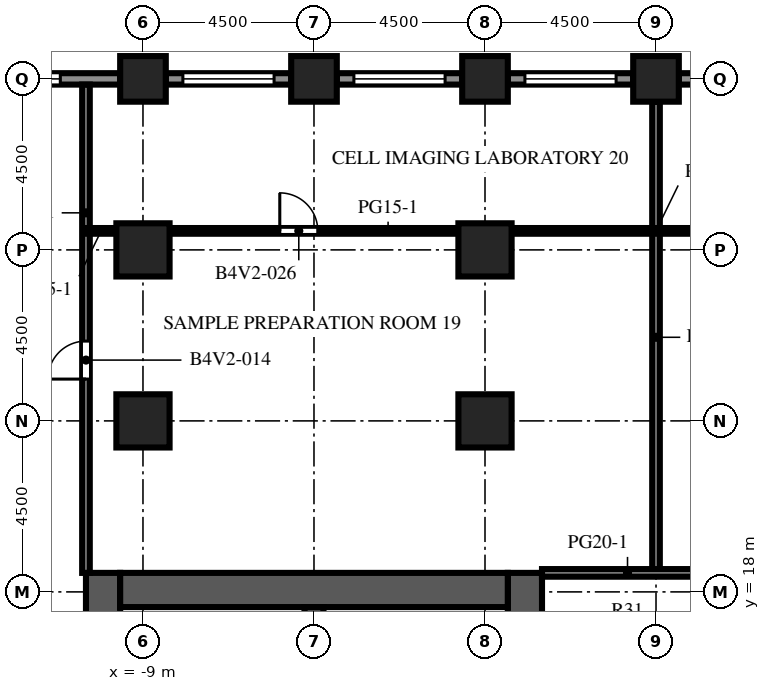
"""IFC4 building model, lengths in metres.
Left out: names, types, materials, properties, quantities, classifications, styles, units other than length and angle.
Written with IfcOpenShell. Run it as: python <this file> out.ifc"""

import sys

from ifc_helpers import new_model, si_unit, direction, frame, frame_2d, origin, origin_2d, place, context, subcontext, project, spatial, rectangle, extrude, element, fill, save


model = new_model("IFC4")
c1 = context("Model", 3, precision=1e-05, world=origin(), true_north=direction((0.0, 1.0)))
c2 = subcontext(c1, "Body", "Model", "MODEL_VIEW")
j1 = project(units=[si_unit("LENGTHUNIT", "METRE"), si_unit("PLANEANGLEUNIT", "RADIAN")], contexts=[c1])
p1 = place(None, origin())
s1 = spatial("IfcSite", under=j1, at=p1, CompositionType="ELEMENT")
p2 = place(p1, origin())
s2 = spatial("IfcBuilding", under=s1, at=p2, CompositionType="ELEMENT")
p3 = place(p2, frame((0.0, 0.0, 137.2)))
s3 = spatial("IfcBuildingStorey", under=s2, at=p3, CompositionType="ELEMENT", Elevation=137.2)
for number, where, z_axis, x_axis in (
    (1, (-9.0, 31.5, 0.0), (0.0, 0.0, 1.0), (1.0, 0.0, 0.0)),
    (2, (-4.5, 31.5, 0.0), (0.0, 0.0, 1.0), (1.0, 0.0, 0.0)),
    (3, (0.0, 31.5, 0.0), (0.0, 0.0, 1.0), (1.0, 0.0, 0.0)),
    (4, (4.5, 31.5, 0.0), (0.0, 0.0, 1.0), (1.0, 0.0, 0.0)),
):
    element("IfcColumn", number, at=place(p3, frame(where, z_axis=z_axis, x_axis=x_axis)), inside=s3, PredefinedType="COLUMN", context=c2, shape_type="SweptSolid", body=[
        extrude(rectangle(XDim=1.2, YDim=1.2, at=origin_2d()), origin(), (0.0, 0.0, 1.0), 4.1),
    ])
for number, where, z_axis, x_axis in (
    (5, (-9.0, 22.5, 0.0), (0.0, 0.0, 1.0), (1.0, 0.0, 0.0)),
    (6, (-9.0, 27.0, 0.0), (0.0, 0.0, 1.0), (1.0, 0.0, 0.0)),
    (7, (0.0, 22.5, 0.0), (0.0, 0.0, 1.0), (1.0, 0.0, 0.0)),
    (8, (0.0, 27.0, 0.0), (0.0, 0.0, 1.0), (1.0, 0.0, 0.0)),
):
    element("IfcColumn", number, at=place(p3, frame(where, z_axis=z_axis, x_axis=x_axis)), inside=s3, PredefinedType="COLUMN", context=c2, shape_type="SweptSolid", body=[
        extrude(rectangle(XDim=1.4, YDim=1.4, at=origin_2d()), origin(), (0.0, 0.0, 1.0), 4.1),
    ])
p4 = place(p3, frame((-10.05, -9.0, 0.0), z_axis=(0.0, 0.0, 1.0), x_axis=(0.0, 1.0, 0.0)))
e9 = element("IfcWall", 9, at=p4, inside=s3, PredefinedType="SHEAR", context=c2, shape_type="SweptSolid", body=[
    extrude(rectangle(XDim=27.5, YDim=0.9, at=frame_2d((13.75, 0.0))), origin(), (0.0, 0.0, 1.0), 4.1),
])
p5 = place(p4, frame((12.55, 0.0, 0.0)))
e10 = element("IfcOpeningElement", 10, at=p5, cuts=e9, PredefinedType="OPENING", context=c2, shape_type="SweptSolid", body=[
    extrude(rectangle(XDim=2.4, YDim=2.4, at=frame_2d((1.2, 1.2))), frame((0.0, 0.46, 0.0), z_axis=(0.0, -1.0, 0.0), x_axis=(1.0, 0.0, 0.0)), (0.0, 0.0, 1.0), 0.92),
])
p6 = place(p4, frame((6.825, 0.0, 0.0)))
e11 = element("IfcOpeningElement", 11, at=p6, cuts=e9, PredefinedType="OPENING", context=c2, shape_type="SweptSolid", body=[
    extrude(rectangle(XDim=1.2, YDim=2.1, at=frame_2d((0.6, 1.05))), frame((0.0, 0.46, 0.0), z_axis=(0.0, -1.0, 0.0), x_axis=(1.0, 0.0, 0.0)), (0.0, 0.0, 1.0), 0.92),
])
p7 = place(p4, frame((19.475, 0.0, 0.0)))
e12 = element("IfcOpeningElement", 12, at=p7, cuts=e9, PredefinedType="OPENING", context=c2, shape_type="SweptSolid", body=[
    extrude(rectangle(XDim=1.2, YDim=2.1, at=frame_2d((0.6, 1.05))), frame((0.0, 0.46, 0.0), z_axis=(0.0, -1.0, 0.0), x_axis=(1.0, 0.0, 0.0)), (0.0, 0.0, 1.0), 0.92),
])
p8 = place(p3, frame((1.05, -9.0, 0.0), z_axis=(0.0, 0.0, 1.0), x_axis=(0.0, 1.0, 0.0)))
e13 = element("IfcWall", 13, at=p8, inside=s3, PredefinedType="SHEAR", context=c2, shape_type="SweptSolid", body=[
    extrude(rectangle(XDim=27.5, YDim=0.9, at=frame_2d((13.75, 0.0))), origin(), (0.0, 0.0, 1.0), 4.1),
])
p9 = place(p8, frame((12.55, 0.0, 0.0)))
e14 = element("IfcOpeningElement", 14, at=p9, cuts=e13, PredefinedType="OPENING", context=c2, shape_type="SweptSolid", body=[
    extrude(rectangle(XDim=2.4, YDim=2.4, at=frame_2d((1.2, 1.2))), frame((0.0, 0.46, 0.0), z_axis=(0.0, -1.0, 0.0), x_axis=(1.0, 0.0, 0.0)), (0.0, 0.0, 1.0), 0.92),
])
p10 = place(p8, frame((5.51, 0.0, 0.0)))
e15 = element("IfcOpeningElement", 15, at=p10, cuts=e13, PredefinedType="OPENING", context=c2, shape_type="SweptSolid", body=[
    extrude(rectangle(XDim=0.923, YDim=2.1, at=frame_2d((0.461, 1.05))), frame((0.0, 0.46, 0.0), z_axis=(0.0, -1.0, 0.0), x_axis=(1.0, 0.0, 0.0)), (0.0, 0.0, 1.0), 0.92),
])
p11 = place(p8, frame((23.427, 0.0, 0.0)))
e16 = element("IfcOpeningElement", 16, at=p11, cuts=e13, PredefinedType="OPENING", context=c2, shape_type="SweptSolid", body=[
    extrude(rectangle(XDim=1.2, YDim=2.1, at=frame_2d((0.6, 1.05))), frame((0.0, 0.46, 0.0), z_axis=(0.0, -1.0, 0.0), x_axis=(1.0, 0.0, 0.0)), (0.0, 0.0, 1.0), 0.92),
])
p12 = place(p3, frame((-9.6, 18.05, 0.0), z_axis=(0.0, 0.0, 1.0), x_axis=(1.0, 0.0, 0.0)))
e17 = element("IfcWall", 17, at=p12, inside=s3, PredefinedType="SHEAR", context=c2, shape_type="SweptSolid", body=[
    extrude(rectangle(XDim=10.2, YDim=0.9, at=frame_2d((5.1, 0.0))), origin(), (0.0, 0.0, 1.0), 4.1),
])
p13 = place(p3, frame((-4.5, 10.25, 0.0), z_axis=(0.0, 0.0, 1.0), x_axis=(0.0, 1.0, 0.0)))
e18 = element("IfcWall", 18, at=p13, inside=s3, PredefinedType="SHEAR", context=c2, shape_type="SweptSolid", body=[
    extrude(rectangle(XDim=7.35, YDim=0.5, at=frame_2d((3.675, 0.0))), origin(), (0.0, 0.0, 1.0), 4.1),
])
p14 = place(p3, frame((5.1, 31.5, 0.0), z_axis=(0.0, 0.0, 1.0), x_axis=(1.0, 0.0, 0.0)))
e19 = element("IfcWall", 19, at=p14, inside=s3, PredefinedType="SOLIDWALL", context=c2, shape_type="SweptSolid", body=[
    extrude(rectangle(XDim=3.3, YDim=0.3, at=frame_2d((1.65, 0.0))), origin(), (0.0, 0.0, 1.0), 2.75),
])
p15 = place(p14, frame((0.45, 0.0, 0.8)))
e20 = element("IfcOpeningElement", 20, at=p15, cuts=e19, PredefinedType="OPENING", context=c2, shape_type="SweptSolid", body=[
    extrude(rectangle(XDim=2.4, YDim=1.7, at=frame_2d((1.2, 0.85))), frame((0.0, 0.16, 0.0), z_axis=(0.0, -1.0, 0.0), x_axis=(1.0, 0.0, 0.0)), (0.0, 0.0, 1.0), 0.32),
])
p16 = place(p3, frame((0.6, 31.5, 0.0), z_axis=(0.0, 0.0, 1.0), x_axis=(1.0, 0.0, 0.0)))
e21 = element("IfcWall", 21, at=p16, inside=s3, PredefinedType="SOLIDWALL", context=c2, shape_type="SweptSolid", body=[
    extrude(rectangle(XDim=3.3, YDim=0.3, at=frame_2d((1.65, 0.0))), origin(), (0.0, 0.0, 1.0), 2.75),
])
p17 = place(p16, frame((0.45, 0.0, 0.8)))
e22 = element("IfcOpeningElement", 22, at=p17, cuts=e21, PredefinedType="OPENING", context=c2, shape_type="SweptSolid", body=[
    extrude(rectangle(XDim=2.4, YDim=1.7, at=frame_2d((1.2, 0.85))), frame((0.0, 0.16, 0.0), z_axis=(0.0, -1.0, 0.0), x_axis=(1.0, 0.0, 0.0)), (0.0, 0.0, 1.0), 0.32),
])
p18 = place(p3, frame((-3.9, 31.5, 0.0), z_axis=(0.0, 0.0, 1.0), x_axis=(1.0, 0.0, 0.0)))
e23 = element("IfcWall", 23, at=p18, inside=s3, PredefinedType="SOLIDWALL", context=c2, shape_type="SweptSolid", body=[
    extrude(rectangle(XDim=3.3, YDim=0.3, at=frame_2d((1.65, 0.0))), origin(), (0.0, 0.0, 1.0), 2.75),
])
p19 = place(p18, frame((0.45, 0.0, 0.8)))
e24 = element("IfcOpeningElement", 24, at=p19, cuts=e23, PredefinedType="OPENING", context=c2, shape_type="SweptSolid", body=[
    extrude(rectangle(XDim=2.4, YDim=1.7, at=frame_2d((1.2, 0.85))), frame((0.0, 0.16, 0.0), z_axis=(0.0, -1.0, 0.0), x_axis=(1.0, 0.0, 0.0)), (0.0, 0.0, 1.0), 0.32),
])
p20 = place(p3, frame((-8.4, 31.5, 0.0), z_axis=(0.0, 0.0, 1.0), x_axis=(1.0, 0.0, 0.0)))
e25 = element("IfcWall", 25, at=p20, inside=s3, PredefinedType="SOLIDWALL", context=c2, shape_type="SweptSolid", body=[
    extrude(rectangle(XDim=3.3, YDim=0.3, at=frame_2d((1.65, 0.0))), origin(), (0.0, 0.0, 1.0), 2.75),
])
p21 = place(p20, frame((0.45, 0.0, 0.8)))
e26 = element("IfcOpeningElement", 26, at=p21, cuts=e25, PredefinedType="OPENING", context=c2, shape_type="SweptSolid", body=[
    extrude(rectangle(XDim=2.4, YDim=1.7, at=frame_2d((1.2, 0.85))), frame((0.0, 0.16, 0.0), z_axis=(0.0, -1.0, 0.0), x_axis=(1.0, 0.0, 0.0)), (0.0, 0.0, 1.0), 0.32),
])
p22 = place(p3, frame((-12.9, 31.5, 0.0), z_axis=(0.0, 0.0, 1.0), x_axis=(1.0, 0.0, 0.0)))
e27 = element("IfcWall", 27, at=p22, inside=s3, PredefinedType="SOLIDWALL", context=c2, shape_type="SweptSolid", body=[
    extrude(rectangle(XDim=3.3, YDim=0.3, at=frame_2d((1.65, 0.0))), origin(), (0.0, 0.0, 1.0), 2.75),
])
p23 = place(p22, frame((0.525, 0.0, 0.8)))
e28 = element("IfcOpeningElement", 28, at=p23, cuts=e27, PredefinedType="OPENING", context=c2, shape_type="SweptSolid", body=[
    extrude(rectangle(XDim=1.2, YDim=1.7, at=frame_2d((0.6, 0.85))), frame((0.0, 0.16, 0.0), z_axis=(0.0, -1.0, 0.0), x_axis=(1.0, 0.0, 0.0)), (0.0, 0.0, 1.0), 0.32),
])
p24 = place(p3, frame((-0.7, 15.028, 0.0), z_axis=(0.0, 0.0, 1.0), x_axis=(0.0, 1.0, 0.0)))
e29 = element("IfcWall", 29, at=p24, inside=s3, PredefinedType="PARTITIONING", context=c2, shape_type="SweptSolid", body=[
    extrude(rectangle(XDim=2.573, YDim=0.1, at=frame_2d((1.286, 0.0))), origin(), (0.0, 0.0, 1.0), 3.65),
])
p25 = place(p24, frame((0.786, 0.0, 0.0)))
e30 = element("IfcOpeningElement", 30, at=p25, cuts=e29, PredefinedType="OPENING", context=c2, shape_type="SweptSolid", body=[
    extrude(rectangle(XDim=1.0, YDim=2.1, at=frame_2d((0.5, 1.05))), frame((0.0, 0.06, 0.0), z_axis=(0.0, -1.0, 0.0), x_axis=(1.0, 0.0, 0.0)), (0.0, 0.0, 1.0), 0.12),
])
p26 = place(p3, frame((-10.5, 31.35, 0.0), z_axis=(0.0, 0.0, 1.0), x_axis=(0.0, -1.0, 0.0)))
e31 = element("IfcWall", 31, at=p26, inside=s3, PredefinedType="PARTITIONING", context=c2, shape_type="SweptSolid", body=[
    extrude(rectangle(XDim=12.85, YDim=0.2, at=frame_2d((6.425, 0.0))), origin(), (0.0, 0.0, 1.0), 3.65),
])
p27 = place(p26, frame((6.75, 0.0, 0.0)))
e32 = element("IfcOpeningElement", 32, at=p27, cuts=e31, PredefinedType="OPENING", context=c2, shape_type="SweptSolid", body=[
    extrude(rectangle(XDim=1.0, YDim=2.1, at=frame_2d((0.5, 1.05))), frame((0.0, 0.11, 0.0), z_axis=(0.0, -1.0, 0.0), x_axis=(1.0, 0.0, 0.0)), (0.0, 0.0, 1.0), 0.22),
])
p28 = place(p3, frame((4.5, 18.5, 0.0), z_axis=(0.0, 0.0, 1.0), x_axis=(0.0, 1.0, 0.0)))
e33 = element("IfcWall", 33, at=p28, inside=s3, PredefinedType="PARTITIONING", context=c2, shape_type="SweptSolid", body=[
    extrude(rectangle(XDim=12.4, YDim=0.2, at=frame_2d((6.2, 0.0))), origin(), (0.0, 0.0, 1.0), 3.65),
])
p29 = place(p3, frame((1.5, 18.5, 0.0), z_axis=(0.0, 0.0, 1.0), x_axis=(1.0, 0.0, 0.0)))
e34 = element("IfcWall", 34, at=p29, inside=s3, PredefinedType="PARTITIONING", context=c2, shape_type="SweptSolid", body=[
    extrude(rectangle(XDim=4.5, YDim=0.2, at=frame_2d((2.25, 0.0))), origin(), (0.0, 0.0, 1.0), 3.65),
])
p30 = place(p3, frame((-10.5, 27.5, 0.0), z_axis=(0.0, 0.0, 1.0), x_axis=(1.0, 0.0, 0.0)))
e35 = element("IfcWall", 35, at=p30, inside=s3, PredefinedType="PARTITIONING", context=c2, shape_type="SweptSolid", body=[
    extrude(rectangle(XDim=0.8, YDim=0.15, at=frame_2d((0.4, 0.0))), origin(), (0.0, 0.0, 1.0), 3.65),
])
p31 = place(p3, frame((-8.3, 27.5, 0.0), z_axis=(0.0, 0.0, 1.0), x_axis=(1.0, 0.0, 0.0)))
e36 = element("IfcWall", 36, at=p31, inside=s3, PredefinedType="PARTITIONING", context=c2, shape_type="SweptSolid", body=[
    extrude(rectangle(XDim=7.6, YDim=0.15, at=frame_2d((3.8, 0.0))), origin(), (0.0, 0.0, 1.0), 3.65),
])
p32 = place(p31, frame((2.9, 0.0, 0.0)))
e37 = element("IfcOpeningElement", 37, at=p32, cuts=e36, PredefinedType="OPENING", context=c2, shape_type="SweptSolid", body=[
    extrude(rectangle(XDim=1.0, YDim=2.1, at=frame_2d((0.5, 1.05))), frame((0.0, 0.085, 0.0), z_axis=(0.0, -1.0, 0.0), x_axis=(1.0, 0.0, 0.0)), (0.0, 0.0, 1.0), 0.17),
])
p33 = place(p3, frame((0.7, 27.5, 0.0), z_axis=(0.0, 0.0, 1.0), x_axis=(1.0, 0.0, 0.0)))
e38 = element("IfcWall", 38, at=p33, inside=s3, PredefinedType="PARTITIONING", context=c2, shape_type="SweptSolid", body=[
    extrude(rectangle(XDim=7.6, YDim=0.15, at=frame_2d((3.8, 0.0))), origin(), (0.0, 0.0, 1.0), 3.65),
])
p34 = place(p17, origin())
e39 = element("IfcWindow", 39, at=p34, inside=s3, PartitioningType="SINGLE_PANEL", PredefinedType="WINDOW", context=c2, shape_type="SweptSolid", body=[
    extrude(rectangle(XDim=2.4, YDim=1.7, at=frame_2d((1.2, 0.85))), frame((0.0, 0.03, 0.0), z_axis=(0.0, -1.0, 0.0), x_axis=(1.0, 0.0, 0.0)), (0.0, 0.0, 1.0), 0.06),
])
fill(e22, e39)
p35 = place(p19, origin())
e40 = element("IfcWindow", 40, at=p35, inside=s3, PartitioningType="SINGLE_PANEL", PredefinedType="WINDOW", context=c2, shape_type="SweptSolid", body=[
    extrude(rectangle(XDim=2.4, YDim=1.7, at=frame_2d((1.2, 0.85))), frame((0.0, 0.03, 0.0), z_axis=(0.0, -1.0, 0.0), x_axis=(1.0, 0.0, 0.0)), (0.0, 0.0, 1.0), 0.06),
])
fill(e24, e40)
p36 = place(p21, origin())
e41 = element("IfcWindow", 41, at=p36, inside=s3, PartitioningType="SINGLE_PANEL", PredefinedType="WINDOW", context=c2, shape_type="SweptSolid", body=[
    extrude(rectangle(XDim=2.4, YDim=1.7, at=frame_2d((1.2, 0.85))), frame((0.0, 0.03, 0.0), z_axis=(0.0, -1.0, 0.0), x_axis=(1.0, 0.0, 0.0)), (0.0, 0.0, 1.0), 0.06),
])
fill(e26, e41)
p37 = place(p23, origin())
e42 = element("IfcWindow", 42, at=p37, inside=s3, PartitioningType="SINGLE_PANEL", PredefinedType="WINDOW", context=c2, shape_type="SweptSolid", body=[
    extrude(rectangle(XDim=1.2, YDim=1.7, at=frame_2d((0.6, 0.85))), frame((0.0, 0.03, 0.0), z_axis=(0.0, -1.0, 0.0), x_axis=(1.0, 0.0, 0.0)), (0.0, 0.0, 1.0), 0.06),
])
fill(e28, e42)
p38 = place(p27, origin())
e43 = element("IfcDoor", 43, at=p38, inside=s3, OperationType="SINGLE_SWING_RIGHT", PredefinedType="DOOR", context=c2, shape_type="SweptSolid", body=[
    extrude(rectangle(XDim=1.0, YDim=2.1, at=frame_2d((0.5, 1.05))), frame((0.0, 0.025, 0.0), z_axis=(0.0, -1.0, 0.0), x_axis=(1.0, 0.0, 0.0)), (0.0, 0.0, 1.0), 0.05),
])
fill(e32, e43)
p39 = place(p32, origin())
e44 = element("IfcDoor", 44, at=p39, inside=s3, OperationType="SINGLE_SWING_LEFT", PredefinedType="DOOR", context=c2, shape_type="SweptSolid", body=[
    extrude(rectangle(XDim=1.0, YDim=2.1, at=frame_2d((0.5, 1.05))), frame((0.0, 0.025, 0.0), z_axis=(0.0, -1.0, 0.0), x_axis=(1.0, 0.0, 0.0)), (0.0, 0.0, 1.0), 0.05),
])
fill(e37, e44)
save(model, sys.argv[1])
